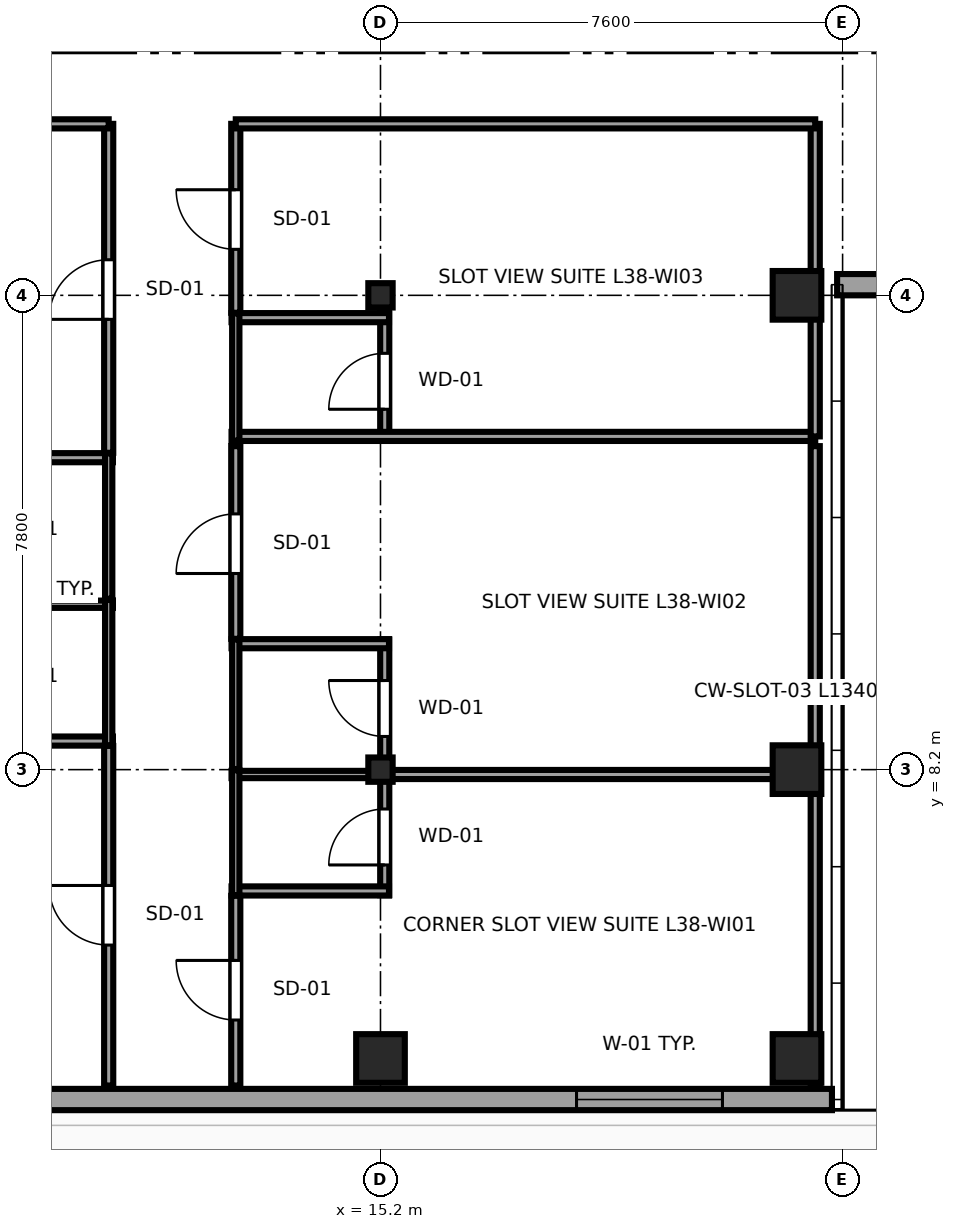
"""IFC4 building model, lengths in metres.
Left out: names, types, materials, properties, quantities, classifications, styles, units other than length and angle.
Written with IfcOpenShell. Run it as: python <this file> out.ifc"""

import sys

from ifc_helpers import new_model, si_unit, direction, frame, frame_2d, origin, origin_2d, place, context, subcontext, project, spatial, rectangle, i_section, extrude, source, transform, mapped, element, fill, save


model = new_model("IFC4")
c1 = context("Model", 3, precision=1e-05, world=origin(), true_north=direction((0.0, 1.0)))
c2 = subcontext(c1, "Body", "Model", "MODEL_VIEW")
j1 = project(units=[si_unit("LENGTHUNIT", "METRE"), si_unit("PLANEANGLEUNIT", "RADIAN")], contexts=[c1])
p1 = place(None, origin())
s1 = spatial("IfcSite", under=j1, at=p1, CompositionType="ELEMENT")
p2 = place(p1, origin())
s2 = spatial("IfcBuilding", under=s1, at=p2, CompositionType="ELEMENT")
p3 = place(p2, frame((0.0, 0.0, 147.05)))
s3 = spatial("IfcBuildingStorey", under=s2, at=p3, CompositionType="ELEMENT", Elevation=147.05)
m1 = source(origin(), c2, "Body", "SweptSolid", [
    extrude(rectangle(XDim=0.8, YDim=0.8, at=origin_2d()), origin(), (0.0, 0.0, 1.0), 3.55),
])
p4 = place(p3, frame((15.2, 3.45, 0.0), z_axis=(0.0, 0.0, 1.0), x_axis=(1.0, 0.0, 0.0)))
e1 = element("IfcColumn", 1, at=p4, inside=s3, PredefinedType="COLUMN", context=c2, shape_type="MappedRepresentation", body=[
    mapped(m1, transform((0.0, 0.0, 0.0), x_axis=(1.0, 0.0, 0.0), y_axis=(0.0, 1.0, 0.0), z_axis=(0.0, 0.0, 1.0), scale=1.0)),
])
m2 = source(origin(), c2, "Body", "SweptSolid", [
    extrude(i_section(OverallWidth=0.4, OverallDepth=0.4, WebThickness=0.02, FlangeThickness=0.035, at=origin_2d()), origin(), (0.0, 0.0, 1.0), 3.55),
])
for number, where, z_axis, x_axis in (
    (2, (15.2, 8.2, 0.0), (0.0, 0.0, 1.0), (1.0, 0.0, 0.0)),
    (3, (15.2, 16.0, 0.0), (0.0, 0.0, 1.0), (1.0, 0.0, 0.0)),
):
    element("IfcColumn", number, at=place(p3, frame(where, z_axis=z_axis, x_axis=x_axis)), inside=s3, PredefinedType="COLUMN", context=c2, shape_type="MappedRepresentation", body=[
        mapped(m2, transform((0.0, 0.0, 0.0), x_axis=(1.0, 0.0, 0.0), y_axis=(0.0, 1.0, 0.0), z_axis=(0.0, 0.0, 1.0), scale=1.0)),
    ])
for number, where, z_axis, x_axis in (
    (4, (22.05, 3.45, 0.0), (0.0, 0.0, 1.0), (1.0, 0.0, 0.0)),
    (5, (22.05, 8.2, 0.0), (0.0, 0.0, 1.0), (1.0, 0.0, 0.0)),
    (6, (22.05, 16.0, 0.0), (0.0, 0.0, 1.0), (1.0, 0.0, 0.0)),
):
    element("IfcColumn", number, at=place(p3, frame(where, z_axis=z_axis, x_axis=x_axis)), inside=s3, PredefinedType="COLUMN", context=c2, shape_type="MappedRepresentation", body=[
        mapped(m1, transform((0.0, 0.0, 0.0), x_axis=(1.0, 0.0, 0.0), y_axis=(0.0, 1.0, 0.0), z_axis=(0.0, 0.0, 1.0), scale=1.0)),
    ])
p5 = place(p3, frame((7.017, 2.775, 0.0), z_axis=(0.0, 0.0, 1.0), x_axis=(1.0, 0.0, 0.0)))
e7 = element("IfcWall", 7, at=p5, inside=s3, PredefinedType="SOLIDWALL", context=c2, shape_type="SweptSolid", body=[
    extrude(rectangle(XDim=15.608, YDim=0.35, at=frame_2d((7.804, 0.0))), origin(), (0.0, 0.0, 1.0), 3.37),
])
p6 = place(p5, frame((11.407, 0.0, 0.68)))
e8 = element("IfcOpeningElement", 8, at=p6, cuts=e7, PredefinedType="OPENING", context=c2, shape_type="SweptSolid", body=[
    extrude(rectangle(XDim=2.4, YDim=1.9, at=frame_2d((1.2, 0.95))), frame((0.0, 0.185, 0.0), z_axis=(0.0, -1.0, 0.0), x_axis=(1.0, 0.0, 0.0)), (0.0, 0.0, 1.0), 0.37),
])
p7 = place(p3, frame((22.71, 16.175, 0.0), z_axis=(0.0, 0.0, 1.0), x_axis=(1.0, 0.0, 0.0)))
e9 = element("IfcWall", 9, at=p7, inside=s3, PredefinedType="SOLIDWALL", context=c2, shape_type="SweptSolid", body=[
    extrude(rectangle(XDim=11.58, YDim=0.35, at=frame_2d((5.79, 0.0))), origin(), (0.0, 0.0, 1.0), 2.16),
])
p8 = place(p3, frame((8.21, 8.67, 0.0), z_axis=(0.0, 0.0, 1.0), x_axis=(1.0, 0.0, 0.0)))
e10 = element("IfcWall", 10, at=p8, inside=s3, PredefinedType="PARTITIONING", context=c2, shape_type="SweptSolid", body=[
    extrude(rectangle(XDim=2.59, YDim=0.15, at=frame_2d((1.295, 0.0))), origin(), (0.0, 0.0, 1.0), 3.37),
])
p9 = place(p3, frame((8.21, 10.92, 0.0), z_axis=(0.0, 0.0, 1.0), x_axis=(1.0, 0.0, 0.0)))
e11 = element("IfcWall", 11, at=p9, inside=s3, PredefinedType="PLUMBINGWALL", context=c2, shape_type="SweptSolid", body=[
    extrude(rectangle(XDim=2.59, YDim=0.12, at=frame_2d((1.295, 0.0))), origin(), (0.0, 0.0, 1.0), 3.37),
])
p10 = place(p3, frame((10.73, 8.6, 0.0), z_axis=(0.0, 0.0, 1.0), x_axis=(0.0, 1.0, 0.0)))
e12 = element("IfcWall", 12, at=p10, inside=s3, PredefinedType="PLUMBINGWALL", context=c2, shape_type="SweptSolid", body=[
    extrude(rectangle(XDim=2.39, YDim=0.12, at=frame_2d((1.195, 0.0))), origin(), (0.0, 0.0, 1.0), 3.37),
])
p11 = place(p3, frame((8.21, 13.33, 0.0), z_axis=(0.0, 0.0, 1.0), x_axis=(1.0, 0.0, 0.0)))
e13 = element("IfcWall", 13, at=p11, inside=s3, PredefinedType="PARTITIONING", context=c2, shape_type="SweptSolid", body=[
    extrude(rectangle(XDim=2.59, YDim=0.15, at=frame_2d((1.295, 0.0))), origin(), (0.0, 0.0, 1.0), 3.37),
])
p12 = place(p3, frame((10.73, 11.01, 0.0), z_axis=(0.0, 0.0, 1.0), x_axis=(0.0, 1.0, 0.0)))
e14 = element("IfcWall", 14, at=p12, inside=s3, PredefinedType="PLUMBINGWALL", context=c2, shape_type="SweptSolid", body=[
    extrude(rectangle(XDim=2.39, YDim=0.12, at=frame_2d((1.195, 0.0))), origin(), (0.0, 0.0, 1.0), 3.37),
])
p13 = place(p3, frame((15.27, 6.135, 0.0), z_axis=(0.0, 0.0, 1.0), x_axis=(0.0, 1.0, 0.0)))
e15 = element("IfcWall", 15, at=p13, inside=s3, PredefinedType="PARTITIONING", context=c2, shape_type="SweptSolid", body=[
    extrude(rectangle(XDim=2.055, YDim=0.15, at=frame_2d((1.027, 0.0))), origin(), (0.0, 0.0, 1.0), 2.16),
])
p14 = place(p13, frame((0.498, 0.0, 0.0)))
e16 = element("IfcOpeningElement", 16, at=p14, cuts=e15, PredefinedType="OPENING", context=c2, shape_type="SweptSolid", body=[
    extrude(rectangle(XDim=0.92, YDim=2.01, at=frame_2d((0.46, 1.005))), frame((0.0, 0.085, 0.0), z_axis=(0.0, -1.0, 0.0), x_axis=(1.0, 0.0, 0.0)), (0.0, 0.0, 1.0), 0.17),
])
p15 = place(p3, frame((12.75, 6.205, 0.0), z_axis=(0.0, 0.0, 1.0), x_axis=(1.0, 0.0, 0.0)))
e17 = element("IfcWall", 17, at=p15, inside=s3, PredefinedType="PARTITIONING", context=c2, shape_type="SweptSolid", body=[
    extrude(rectangle(XDim=2.59, YDim=0.15, at=frame_2d((1.295, 0.0))), origin(), (0.0, 0.0, 1.0), 3.37),
])
p16 = place(p3, frame((12.75, 8.12, 0.0), z_axis=(0.0, 0.0, 1.0), x_axis=(1.0, 0.0, 0.0)))
e18 = element("IfcWall", 18, at=p16, inside=s3, PredefinedType="PLUMBINGWALL", context=c2, shape_type="SweptSolid", body=[
    extrude(rectangle(XDim=2.59, YDim=0.12, at=frame_2d((1.295, 0.0))), origin(), (0.0, 0.0, 1.0), 2.16),
])
p17 = place(p3, frame((12.82, 6.135, 0.0), z_axis=(0.0, 0.0, 1.0), x_axis=(0.0, 1.0, 0.0)))
e19 = element("IfcWall", 19, at=p17, inside=s3, PredefinedType="PLUMBINGWALL", context=c2, shape_type="SweptSolid", body=[
    extrude(rectangle(XDim=2.055, YDim=0.12, at=frame_2d((1.027, 0.0))), origin(), (0.0, 0.0, 1.0), 3.37),
])
p18 = place(p3, frame((15.27, 8.21, 0.0), z_axis=(0.0, 0.0, 1.0), x_axis=(0.0, 1.0, 0.0)))
e20 = element("IfcWall", 20, at=p18, inside=s3, PredefinedType="PARTITIONING", context=c2, shape_type="SweptSolid", body=[
    extrude(rectangle(XDim=2.131, YDim=0.15, at=frame_2d((1.065, 0.0))), origin(), (0.0, 0.0, 1.0), 2.16),
])
p19 = place(p18, frame((0.535, 0.0, 0.0)))
e21 = element("IfcOpeningElement", 21, at=p19, cuts=e20, PredefinedType="OPENING", context=c2, shape_type="SweptSolid", body=[
    extrude(rectangle(XDim=0.92, YDim=2.01, at=frame_2d((0.46, 1.005))), frame((0.0, 0.085, 0.0), z_axis=(0.0, -1.0, 0.0), x_axis=(1.0, 0.0, 0.0)), (0.0, 0.0, 1.0), 0.17),
])
p20 = place(p3, frame((12.75, 10.271, 0.0), z_axis=(0.0, 0.0, 1.0), x_axis=(1.0, 0.0, 0.0)))
e22 = element("IfcWall", 22, at=p20, inside=s3, PredefinedType="PARTITIONING", context=c2, shape_type="SweptSolid", body=[
    extrude(rectangle(XDim=2.59, YDim=0.15, at=frame_2d((1.295, 0.0))), origin(), (0.0, 0.0, 1.0), 3.37),
])
p21 = place(p3, frame((12.82, 8.21, 0.0), z_axis=(0.0, 0.0, 1.0), x_axis=(0.0, 1.0, 0.0)))
e23 = element("IfcWall", 23, at=p21, inside=s3, PredefinedType="PLUMBINGWALL", context=c2, shape_type="SweptSolid", body=[
    extrude(rectangle(XDim=2.131, YDim=0.12, at=frame_2d((1.065, 0.0))), origin(), (0.0, 0.0, 1.0), 3.37),
])
p22 = place(p3, frame((15.27, 13.61, 0.0), z_axis=(0.0, 0.0, 1.0), x_axis=(0.0, 1.0, 0.0)))
e24 = element("IfcWall", 24, at=p22, inside=s3, PredefinedType="PARTITIONING", context=c2, shape_type="SweptSolid", body=[
    extrude(rectangle(XDim=2.093, YDim=0.15, at=frame_2d((1.046, 0.0))), origin(), (0.0, 0.0, 1.0), 2.16),
])
p23 = place(p22, frame((0.517, 0.0, 0.0)))
e25 = element("IfcOpeningElement", 25, at=p23, cuts=e24, PredefinedType="OPENING", context=c2, shape_type="SweptSolid", body=[
    extrude(rectangle(XDim=0.92, YDim=2.01, at=frame_2d((0.46, 1.005))), frame((0.0, 0.085, 0.0), z_axis=(0.0, -1.0, 0.0), x_axis=(1.0, 0.0, 0.0)), (0.0, 0.0, 1.0), 0.17),
])
p24 = place(p3, frame((12.75, 13.68, 0.0), z_axis=(0.0, 0.0, 1.0), x_axis=(1.0, 0.0, 0.0)))
e26 = element("IfcWall", 26, at=p24, inside=s3, PredefinedType="PARTITIONING", context=c2, shape_type="SweptSolid", body=[
    extrude(rectangle(XDim=9.6, YDim=0.15, at=frame_2d((4.8, 0.0))), origin(), (0.0, 0.0, 1.0), 3.37),
])
p25 = place(p3, frame((12.75, 15.633, 0.0), z_axis=(0.0, 0.0, 1.0), x_axis=(1.0, 0.0, 0.0)))
e27 = element("IfcWall", 27, at=p25, inside=s3, PredefinedType="PARTITIONING", context=c2, shape_type="SweptSolid", body=[
    extrude(rectangle(XDim=2.59, YDim=0.15, at=frame_2d((1.295, 0.0))), origin(), (0.0, 0.0, 1.0), 3.37),
])
p26 = place(p3, frame((12.82, 13.61, 0.0), z_axis=(0.0, 0.0, 1.0), x_axis=(0.0, 1.0, 0.0)))
e28 = element("IfcWall", 28, at=p26, inside=s3, PredefinedType="PLUMBINGWALL", context=c2, shape_type="SweptSolid", body=[
    extrude(rectangle(XDim=2.093, YDim=0.12, at=frame_2d((1.046, 0.0))), origin(), (0.0, 0.0, 1.0), 3.37),
])
p27 = place(p3, frame((10.73, 3.005, 0.0), z_axis=(0.0, 0.0, 1.0), x_axis=(0.0, 1.0, 0.0)))
e29 = element("IfcWall", 29, at=p27, inside=s3, PredefinedType="PARTITIONING", context=c2, shape_type="SweptSolid", body=[
    extrude(rectangle(XDim=5.585, YDim=0.15, at=frame_2d((2.792, 0.0))), origin(), (0.0, 0.0, 1.0), 3.37),
])
p28 = place(p27, frame((2.31, 0.0, 0.0)))
e30 = element("IfcOpeningElement", 30, at=p28, cuts=e29, PredefinedType="OPENING", context=c2, shape_type="SweptSolid", body=[
    extrude(rectangle(XDim=0.98, YDim=2.12, at=frame_2d((0.49, 1.06))), frame((0.0, 0.085, 0.0), z_axis=(0.0, -1.0, 0.0), x_axis=(1.0, 0.0, 0.0)), (0.0, 0.0, 1.0), 0.17),
])
p29 = place(p3, frame((10.73, 13.41, 0.0), z_axis=(0.0, 0.0, 1.0), x_axis=(0.0, 1.0, 0.0)))
e31 = element("IfcWall", 31, at=p29, inside=s3, PredefinedType="PARTITIONING", context=c2, shape_type="SweptSolid", body=[
    extrude(rectangle(XDim=5.41, YDim=0.15, at=frame_2d((2.705, 0.0))), origin(), (0.0, 0.0, 1.0), 3.37),
])
p30 = place(p29, frame((2.195, 0.0, 0.0)))
e32 = element("IfcOpeningElement", 32, at=p30, cuts=e31, PredefinedType="OPENING", context=c2, shape_type="SweptSolid", body=[
    extrude(rectangle(XDim=0.98, YDim=2.12, at=frame_2d((0.49, 1.06))), frame((0.0, 0.085, 0.0), z_axis=(0.0, -1.0, 0.0), x_axis=(1.0, 0.0, 0.0)), (0.0, 0.0, 1.0), 0.17),
])
p31 = place(p3, frame((3.005, 18.82, 0.0), z_axis=(0.0, 0.0, 1.0), x_axis=(1.0, 0.0, 0.0)))
e33 = element("IfcWall", 33, at=p31, inside=s3, PredefinedType="PARTITIONING", context=c2, shape_type="SweptSolid", body=[
    extrude(rectangle(XDim=7.725, YDim=0.15, at=frame_2d((3.863, 0.0))), origin(), (0.0, 0.0, 1.0), 3.37),
])
p32 = place(p3, frame((12.82, 3.005, 0.0), z_axis=(0.0, 0.0, 1.0), x_axis=(0.0, 1.0, 0.0)))
e34 = element("IfcWall", 34, at=p32, inside=s3, PredefinedType="PARTITIONING", context=c2, shape_type="SweptSolid", body=[
    extrude(rectangle(XDim=3.12, YDim=0.15, at=frame_2d((1.56, 0.0))), origin(), (0.0, 0.0, 1.0), 3.37),
])
p33 = place(p32, frame((1.077, 0.0, 0.0)))
e35 = element("IfcOpeningElement", 35, at=p33, cuts=e34, PredefinedType="OPENING", context=c2, shape_type="SweptSolid", body=[
    extrude(rectangle(XDim=0.98, YDim=2.12, at=frame_2d((0.49, 1.06))), frame((0.0, 0.085, 0.0), z_axis=(0.0, -1.0, 0.0), x_axis=(1.0, 0.0, 0.0)), (0.0, 0.0, 1.0), 0.17),
])
p34 = place(p3, frame((22.35, 3.005, 0.0), z_axis=(0.0, 0.0, 1.0), x_axis=(0.0, 1.0, 0.0)))
e36 = element("IfcWall", 36, at=p34, inside=s3, PredefinedType="PARTITIONING", context=c2, shape_type="SweptSolid", body=[
    extrude(rectangle(XDim=5.115, YDim=0.15, at=frame_2d((2.558, 0.0))), origin(), (0.0, 0.0, 1.0), 2.16),
])
p35 = place(p3, frame((15.29, 8.12, 0.0), z_axis=(0.0, 0.0, 1.0), x_axis=(1.0, 0.0, 0.0)))
e37 = element("IfcWall", 37, at=p35, inside=s3, PredefinedType="PARTITIONING", context=c2, shape_type="SweptSolid", body=[
    extrude(rectangle(XDim=7.06, YDim=0.15, at=frame_2d((3.53, 0.0))), origin(), (0.0, 0.0, 1.0), 2.16),
])
p36 = place(p3, frame((12.82, 10.351, 0.0), z_axis=(0.0, 0.0, 1.0), x_axis=(0.0, 1.0, 0.0)))
e38 = element("IfcWall", 38, at=p36, inside=s3, PredefinedType="PARTITIONING", context=c2, shape_type="SweptSolid", body=[
    extrude(rectangle(XDim=3.169, YDim=0.15, at=frame_2d((1.584, 0.0))), origin(), (0.0, 0.0, 1.0), 3.37),
])
p37 = place(p36, frame((1.074, 0.0, 0.0)))
e39 = element("IfcOpeningElement", 39, at=p37, cuts=e38, PredefinedType="OPENING", context=c2, shape_type="SweptSolid", body=[
    extrude(rectangle(XDim=0.98, YDim=2.12, at=frame_2d((0.49, 1.06))), frame((0.0, 0.085, 0.0), z_axis=(0.0, -1.0, 0.0), x_axis=(1.0, 0.0, 0.0)), (0.0, 0.0, 1.0), 0.17),
])
p38 = place(p3, frame((22.35, 8.28, 0.0), z_axis=(0.0, 0.0, 1.0), x_axis=(0.0, 1.0, 0.0)))
e40 = element("IfcWall", 40, at=p38, inside=s3, PredefinedType="PARTITIONING", context=c2, shape_type="SweptSolid", body=[
    extrude(rectangle(XDim=5.24, YDim=0.15, at=frame_2d((2.62, 0.0))), origin(), (0.0, 0.0, 1.0), 2.16),
])
p39 = place(p3, frame((12.82, 15.713, 0.0), z_axis=(0.0, 0.0, 1.0), x_axis=(0.0, 1.0, 0.0)))
e41 = element("IfcWall", 41, at=p39, inside=s3, PredefinedType="PARTITIONING", context=c2, shape_type="SweptSolid", body=[
    extrude(rectangle(XDim=3.107, YDim=0.15, at=frame_2d((1.554, 0.0))), origin(), (0.0, 0.0, 1.0), 3.37),
])
p40 = place(p39, frame((1.043, 0.0, 0.0)))
e42 = element("IfcOpeningElement", 42, at=p40, cuts=e41, PredefinedType="OPENING", context=c2, shape_type="SweptSolid", body=[
    extrude(rectangle(XDim=0.98, YDim=2.12, at=frame_2d((0.49, 1.06))), frame((0.0, 0.085, 0.0), z_axis=(0.0, -1.0, 0.0), x_axis=(1.0, 0.0, 0.0)), (0.0, 0.0, 1.0), 0.17),
])
p41 = place(p3, frame((22.35, 13.68, 0.0), z_axis=(0.0, 0.0, 1.0), x_axis=(0.0, 1.0, 0.0)))
e43 = element("IfcWall", 43, at=p41, inside=s3, PredefinedType="PARTITIONING", context=c2, shape_type="SweptSolid", body=[
    extrude(rectangle(XDim=5.14, YDim=0.15, at=frame_2d((2.57, 0.0))), origin(), (0.0, 0.0, 1.0), 2.16),
])
p42 = place(p3, frame((12.82, 18.82, 0.0), z_axis=(0.0, 0.0, 1.0), x_axis=(1.0, 0.0, 0.0)))
e44 = element("IfcWall", 44, at=p42, inside=s3, PredefinedType="PARTITIONING", context=c2, shape_type="SweptSolid", body=[
    extrude(rectangle(XDim=9.53, YDim=0.15, at=frame_2d((4.765, 0.0))), origin(), (0.0, 0.0, 1.0), 3.37),
])
m3 = source(origin(), c2, "Body", "SweptSolid", [
    extrude(rectangle(XDim=2.4, YDim=1.9, at=frame_2d((1.2, 0.95))), frame((0.0, 0.09, 0.0), z_axis=(0.0, -1.0, 0.0), x_axis=(1.0, 0.0, 0.0)), (0.0, 0.0, 1.0), 0.06),
])
p43 = place(p6, origin())
e45 = element("IfcWindow", 45, at=p43, inside=s3, PartitioningType="TRIPLE_PANEL_HORIZONTAL", PredefinedType="WINDOW", context=c2, shape_type="MappedRepresentation", body=[
    mapped(m3, transform((0.0, 0.0, 0.0), x_axis=(1.0, 0.0, 0.0), y_axis=(0.0, 1.0, 0.0), z_axis=(0.0, 0.0, 1.0), scale=1.0)),
])
fill(e8, e45)
m4 = source(origin(), c2, "Body", "SweptSolid", [
    extrude(rectangle(XDim=0.92, YDim=2.01, at=frame_2d((0.46, 1.005))), frame((0.0, 0.025, 0.0), z_axis=(0.0, -1.0, 0.0), x_axis=(1.0, 0.0, 0.0)), (0.0, 0.0, 1.0), 0.05),
])
p44 = place(p14, origin())
e46 = element("IfcDoor", 46, at=p44, inside=s3, OperationType="SINGLE_SWING_LEFT", PredefinedType="DOOR", context=c2, shape_type="MappedRepresentation", body=[
    mapped(m4, transform((0.0, 0.0, 0.0), x_axis=(1.0, 0.0, 0.0), y_axis=(0.0, 1.0, 0.0), z_axis=(0.0, 0.0, 1.0), scale=1.0)),
])
fill(e16, e46)
p45 = place(p19, origin())
e47 = element("IfcDoor", 47, at=p45, inside=s3, OperationType="SINGLE_SWING_RIGHT", PredefinedType="DOOR", context=c2, shape_type="MappedRepresentation", body=[
    mapped(m4, transform((0.0, 0.0, 0.0), x_axis=(1.0, 0.0, 0.0), y_axis=(0.0, 1.0, 0.0), z_axis=(0.0, 0.0, 1.0), scale=1.0)),
])
fill(e21, e47)
p46 = place(p23, origin())
e48 = element("IfcDoor", 48, at=p46, inside=s3, OperationType="SINGLE_SWING_LEFT", PredefinedType="DOOR", context=c2, shape_type="MappedRepresentation", body=[
    mapped(m4, transform((0.0, 0.0, 0.0), x_axis=(1.0, 0.0, 0.0), y_axis=(0.0, 1.0, 0.0), z_axis=(0.0, 0.0, 1.0), scale=1.0)),
])
fill(e25, e48)
m5 = source(origin(), c2, "Body", "SweptSolid", [
    extrude(rectangle(XDim=0.98, YDim=2.12, at=frame_2d((0.49, 1.06))), frame((0.0, 0.025, 0.0), z_axis=(0.0, -1.0, 0.0), x_axis=(1.0, 0.0, 0.0)), (0.0, 0.0, 1.0), 0.05),
])
p47 = place(p28, origin())
e49 = element("IfcDoor", 49, at=p47, inside=s3, OperationType="SINGLE_SWING_RIGHT", PredefinedType="DOOR", context=c2, shape_type="MappedRepresentation", body=[
    mapped(m5, transform((0.0, 0.0, 0.0), x_axis=(1.0, 0.0, 0.0), y_axis=(0.0, 1.0, 0.0), z_axis=(0.0, 0.0, 1.0), scale=1.0)),
])
fill(e30, e49)
p48 = place(p30, origin())
e50 = element("IfcDoor", 50, at=p48, inside=s3, OperationType="SINGLE_SWING_LEFT", PredefinedType="DOOR", context=c2, shape_type="MappedRepresentation", body=[
    mapped(m5, transform((0.0, 0.0, 0.0), x_axis=(1.0, 0.0, 0.0), y_axis=(0.0, 1.0, 0.0), z_axis=(0.0, 0.0, 1.0), scale=1.0)),
])
fill(e32, e50)
p49 = place(p33, origin())
e51 = element("IfcDoor", 51, at=p49, inside=s3, OperationType="SINGLE_SWING_RIGHT", PredefinedType="DOOR", context=c2, shape_type="MappedRepresentation", body=[
    mapped(m5, transform((0.0, 0.0, 0.0), x_axis=(1.0, 0.0, 0.0), y_axis=(0.0, 1.0, 0.0), z_axis=(0.0, 0.0, 1.0), scale=1.0)),
])
fill(e35, e51)
p50 = place(p37, origin())
e52 = element("IfcDoor", 52, at=p50, inside=s3, OperationType="SINGLE_SWING_LEFT", PredefinedType="DOOR", context=c2, shape_type="MappedRepresentation", body=[
    mapped(m5, transform((0.0, 0.0, 0.0), x_axis=(1.0, 0.0, 0.0), y_axis=(0.0, 1.0, 0.0), z_axis=(0.0, 0.0, 1.0), scale=1.0)),
])
fill(e39, e52)
p51 = place(p40, origin())
e53 = element("IfcDoor", 53, at=p51, inside=s3, OperationType="SINGLE_SWING_RIGHT", PredefinedType="DOOR", context=c2, shape_type="MappedRepresentation", body=[
    mapped(m5, transform((0.0, 0.0, 0.0), x_axis=(1.0, 0.0, 0.0), y_axis=(0.0, 1.0, 0.0), z_axis=(0.0, 0.0, 1.0), scale=1.0)),
])
fill(e42, e53)
save(model, sys.argv[1])
